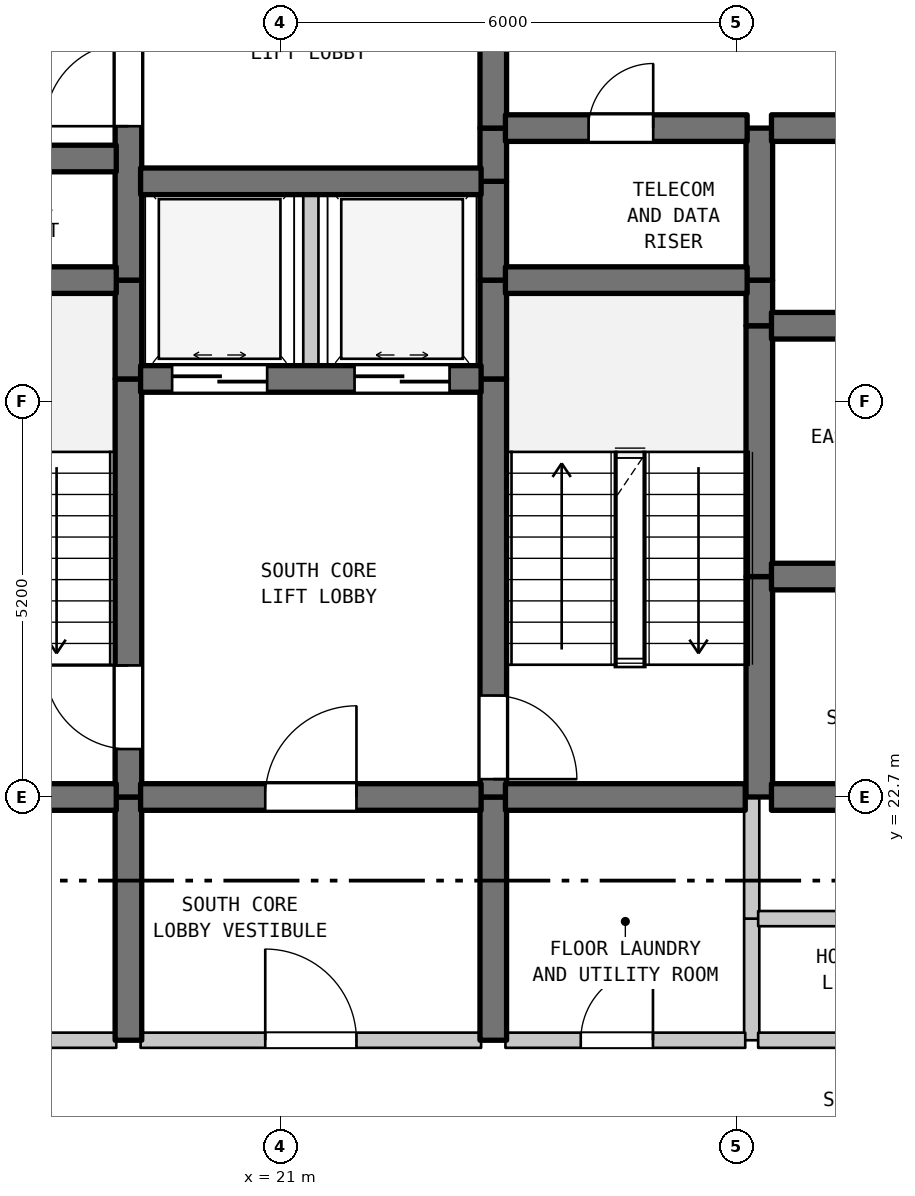
"""IFC4 building model, lengths in metres.
Left out: names, types, materials, properties, quantities, classifications, styles, units other than length and angle.
Written with IfcOpenShell. Run it as: python <this file> out.ifc"""

import sys

from ifc_helpers import new_model, si_unit, direction, frame, frame_2d, origin, place, context, subcontext, project, spatial, rectangle, extrude, element, fill, save


model = new_model("IFC4")
c1 = context("Model", 3, precision=1e-05, world=origin(), true_north=direction((0.0, 1.0)))
c2 = subcontext(c1, "Body", "Model", "MODEL_VIEW")
j1 = project(units=[si_unit("LENGTHUNIT", "METRE"), si_unit("PLANEANGLEUNIT", "RADIAN")], contexts=[c1])
p1 = place(None, origin())
s1 = spatial("IfcSite", under=j1, at=p1, CompositionType="ELEMENT")
p2 = place(p1, origin())
s2 = spatial("IfcBuilding", under=s1, at=p2, CompositionType="ELEMENT")
p3 = place(p2, frame((0.0, 0.0, 230.2)))
s3 = spatial("IfcBuildingStorey", under=s2, at=p3, CompositionType="ELEMENT", Elevation=230.2)
p4 = place(p3, frame((19.0, 19.5, 0.0), z_axis=(0.0, 0.0, 1.0), x_axis=(0.0, 1.0, 0.0)))
e1 = element("IfcWall", 1, at=p4, inside=s3, PredefinedType="SHEAR", context=c2, shape_type="SweptSolid", body=[
    extrude(rectangle(XDim=3.2, YDim=0.35, at=frame_2d((1.6, 0.0))), origin(), (0.0, 0.0, 1.0), 3.39),
])
p5 = place(p3, frame((19.0, 22.7, 0.0), z_axis=(0.0, 0.0, 1.0), x_axis=(0.0, 1.0, 0.0)))
e2 = element("IfcWall", 2, at=p5, inside=s3, PredefinedType="SHEAR", context=c2, shape_type="SweptSolid", body=[
    extrude(rectangle(XDim=5.5, YDim=0.35, at=frame_2d((2.75, 0.0))), origin(), (0.0, 0.0, 1.0), 3.39),
])
p6 = place(p5, frame((0.631, 0.0, 0.0)))
e3 = element("IfcOpeningElement", 3, at=p6, cuts=e2, PredefinedType="OPENING", context=c2, shape_type="SweptSolid", body=[
    extrude(rectangle(XDim=1.1, YDim=2.15, at=frame_2d((0.55, 1.075))), frame((0.0, 0.185, 0.0), z_axis=(0.0, -1.0, 0.0), x_axis=(1.0, 0.0, 0.0)), (0.0, 0.0, 1.0), 0.37),
])
p7 = place(p3, frame((19.0, 28.2, 0.0), z_axis=(0.0, 0.0, 1.0), x_axis=(0.0, 1.0, 0.0)))
e4 = element("IfcWall", 4, at=p7, inside=s3, PredefinedType="SHEAR", context=c2, shape_type="SweptSolid", body=[
    extrude(rectangle(XDim=1.3, YDim=0.35, at=frame_2d((0.65, 0.0))), origin(), (0.0, 0.0, 1.0), 3.39),
])
p8 = place(p3, frame((19.0, 29.5, 0.0), z_axis=(0.0, 0.0, 1.0), x_axis=(0.0, 1.0, 0.0)))
e5 = element("IfcWall", 5, at=p8, inside=s3, PredefinedType="SHEAR", context=c2, shape_type="SweptSolid", body=[
    extrude(rectangle(XDim=5.5, YDim=0.35, at=frame_2d((2.75, 0.0))), origin(), (0.0, 0.0, 1.0), 3.39),
])
p9 = place(p8, frame((2.025, 0.0, 0.0)))
e6 = element("IfcOpeningElement", 6, at=p9, cuts=e5, PredefinedType="OPENING", context=c2, shape_type="SweptSolid", body=[
    extrude(rectangle(XDim=1.1, YDim=2.15, at=frame_2d((0.55, 1.075))), frame((0.0, 0.185, 0.0), z_axis=(0.0, -1.0, 0.0), x_axis=(1.0, 0.0, 0.0)), (0.0, 0.0, 1.0), 0.37),
])
p10 = place(p3, frame((21.4, 28.2, 0.0), z_axis=(0.0, 0.0, 1.0), x_axis=(0.0, 1.0, 0.0)))
e7 = element("IfcWall", 7, at=p10, inside=s3, PredefinedType="STANDARD", context=c2, shape_type="SweptSolid", body=[
    extrude(rectangle(XDim=2.6, YDim=0.2, at=frame_2d((1.3, 0.0))), origin(), (0.0, 0.0, 1.0), 3.39),
])
p11 = place(p3, frame((23.8, 19.5, 0.0), z_axis=(0.0, 0.0, 1.0), x_axis=(0.0, 1.0, 0.0)))
e8 = element("IfcWall", 8, at=p11, inside=s3, PredefinedType="SHEAR", context=c2, shape_type="SweptSolid", body=[
    extrude(rectangle(XDim=3.2, YDim=0.35, at=frame_2d((1.6, 0.0))), origin(), (0.0, 0.0, 1.0), 3.39),
])
p12 = place(p3, frame((23.8, 22.7, 0.0), z_axis=(0.0, 0.0, 1.0), x_axis=(0.0, 1.0, 0.0)))
e9 = element("IfcWall", 9, at=p12, inside=s3, PredefinedType="SHEAR", context=c2, shape_type="SweptSolid", body=[
    extrude(rectangle(XDim=5.5, YDim=0.35, at=frame_2d((2.75, 0.0))), origin(), (0.0, 0.0, 1.0), 3.39),
])
p13 = place(p12, frame((0.235, 0.0, 0.0)))
e10 = element("IfcOpeningElement", 10, at=p13, cuts=e9, PredefinedType="OPENING", context=c2, shape_type="SweptSolid", body=[
    extrude(rectangle(XDim=1.1, YDim=2.15, at=frame_2d((0.55, 1.075))), frame((0.0, 0.185, 0.0), z_axis=(0.0, -1.0, 0.0), x_axis=(1.0, 0.0, 0.0)), (0.0, 0.0, 1.0), 0.37),
])
for number, where, z_axis, x_axis in (
    (11, (23.8, 28.2, 0.0), (0.0, 0.0, 1.0), (0.0, 1.0, 0.0)),
    (12, (23.8, 29.5, 0.0), (0.0, 0.0, 1.0), (0.0, 1.0, 0.0)),
):
    element("IfcWall", number, at=place(p3, frame(where, z_axis=z_axis, x_axis=x_axis)), inside=s3, PredefinedType="SHEAR", context=c2, shape_type="SweptSolid", body=[
        extrude(rectangle(XDim=1.3, YDim=0.35, at=frame_2d((0.65, 0.0))), origin(), (0.0, 0.0, 1.0), 3.39),
    ])
p14 = place(p3, frame((23.8, 30.8, 0.0), z_axis=(0.0, 0.0, 1.0), x_axis=(0.0, 1.0, 0.0)))
e13 = element("IfcWall", 13, at=p14, inside=s3, PredefinedType="SHEAR", context=c2, shape_type="SweptSolid", body=[
    extrude(rectangle(XDim=0.7, YDim=0.35, at=frame_2d((0.35, 0.0))), origin(), (0.0, 0.0, 1.0), 3.39),
])
p15 = place(p3, frame((23.8, 31.5, 0.0), z_axis=(0.0, 0.0, 1.0), x_axis=(0.0, 1.0, 0.0)))
e14 = element("IfcWall", 14, at=p15, inside=s3, PredefinedType="SHEAR", context=c2, shape_type="SweptSolid", body=[
    extrude(rectangle(XDim=3.5, YDim=0.35, at=frame_2d((1.75, 0.0))), origin(), (0.0, 0.0, 1.0), 3.39),
])
p16 = place(p15, frame((1.127, 0.0, 0.0)))
e15 = element("IfcOpeningElement", 15, at=p16, cuts=e14, PredefinedType="OPENING", context=c2, shape_type="SweptSolid", body=[
    extrude(rectangle(XDim=1.1, YDim=2.15, at=frame_2d((0.55, 1.075))), frame((0.0, 0.185, 0.0), z_axis=(0.0, -1.0, 0.0), x_axis=(1.0, 0.0, 0.0)), (0.0, 0.0, 1.0), 0.37),
])
p17 = place(p3, frame((27.2, 19.5, 0.0), z_axis=(0.0, 0.0, 1.0), x_axis=(0.0, 1.0, 0.0)))
e16 = element("IfcWall", 16, at=p17, inside=s3, PredefinedType="STANDARD", context=c2, shape_type="SweptSolid", body=[
    extrude(rectangle(XDim=1.6, YDim=0.2, at=frame_2d((0.8, 0.0))), origin(), (0.0, 0.0, 1.0), 3.39),
])
p18 = place(p3, frame((27.2, 21.1, 0.0), z_axis=(0.0, 0.0, 1.0), x_axis=(0.0, 1.0, 0.0)))
e17 = element("IfcWall", 17, at=p18, inside=s3, PredefinedType="STANDARD", context=c2, shape_type="SweptSolid", body=[
    extrude(rectangle(XDim=1.6, YDim=0.2, at=frame_2d((0.8, 0.0))), origin(), (0.0, 0.0, 1.0), 3.39),
])
p19 = place(p3, frame((27.3, 22.7, 0.0), z_axis=(0.0, 0.0, 1.0), x_axis=(0.0, 1.0, 0.0)))
e18 = element("IfcWall", 18, at=p19, inside=s3, PredefinedType="SHEAR", context=c2, shape_type="SweptSolid", body=[
    extrude(rectangle(XDim=2.9, YDim=0.35, at=frame_2d((1.45, 0.0))), origin(), (0.0, 0.0, 1.0), 3.39),
])
p20 = place(p3, frame((27.3, 25.6, 0.0), z_axis=(0.0, 0.0, 1.0), x_axis=(0.0, 1.0, 0.0)))
e19 = element("IfcWall", 19, at=p20, inside=s3, PredefinedType="SHEAR", context=c2, shape_type="SweptSolid", body=[
    extrude(rectangle(XDim=3.3, YDim=0.35, at=frame_2d((1.65, 0.0))), origin(), (0.0, 0.0, 1.0), 3.39),
])
p21 = place(p3, frame((27.3, 28.9, 0.0), z_axis=(0.0, 0.0, 1.0), x_axis=(0.0, 1.0, 0.0)))
e20 = element("IfcWall", 20, at=p21, inside=s3, PredefinedType="SHEAR", context=c2, shape_type="SweptSolid", body=[
    extrude(rectangle(XDim=0.6, YDim=0.35, at=frame_2d((0.3, 0.0))), origin(), (0.0, 0.0, 1.0), 3.39),
])
p22 = place(p3, frame((27.3, 29.5, 0.0), z_axis=(0.0, 0.0, 1.0), x_axis=(0.0, 1.0, 0.0)))
e21 = element("IfcWall", 21, at=p22, inside=s3, PredefinedType="SHEAR", context=c2, shape_type="SweptSolid", body=[
    extrude(rectangle(XDim=2.0, YDim=0.35, at=frame_2d((1.0, 0.0))), origin(), (0.0, 0.0, 1.0), 3.39),
])
p23 = place(p3, frame((15.16, 19.5, 0.0), z_axis=(0.0, 0.0, 1.0), x_axis=(1.0, 0.0, 0.0)))
e22 = element("IfcWall", 22, at=p23, inside=s3, PredefinedType="STANDARD", context=c2, shape_type="SweptSolid", body=[
    extrude(rectangle(XDim=3.68, YDim=0.2, at=frame_2d((1.84, 0.0))), origin(), (0.0, 0.0, 1.0), 3.39),
])
p24 = place(p23, frame((1.39, 0.0, 0.0)))
e23 = element("IfcOpeningElement", 23, at=p24, cuts=e22, PredefinedType="OPENING", context=c2, shape_type="SweptSolid", body=[
    extrude(rectangle(XDim=0.9, YDim=2.15, at=frame_2d((0.45, 1.075))), frame((0.0, 0.11, 0.0), z_axis=(0.0, -1.0, 0.0), x_axis=(1.0, 0.0, 0.0)), (0.0, 0.0, 1.0), 0.22),
])
p25 = place(p3, frame((19.16, 19.5, 0.0), z_axis=(0.0, 0.0, 1.0), x_axis=(1.0, 0.0, 0.0)))
e24 = element("IfcWall", 24, at=p25, inside=s3, PredefinedType="STANDARD", context=c2, shape_type="SweptSolid", body=[
    extrude(rectangle(XDim=4.48, YDim=0.2, at=frame_2d((2.24, 0.0))), origin(), (0.0, 0.0, 1.0), 3.39),
])
p26 = place(p25, frame((1.64, 0.0, 0.0)))
e25 = element("IfcOpeningElement", 25, at=p26, cuts=e24, PredefinedType="OPENING", context=c2, shape_type="SweptSolid", body=[
    extrude(rectangle(XDim=1.2, YDim=2.2, at=frame_2d((0.6, 1.1))), frame((0.0, 0.11, 0.0), z_axis=(0.0, -1.0, 0.0), x_axis=(1.0, 0.0, 0.0)), (0.0, 0.0, 1.0), 0.22),
])
p27 = place(p3, frame((23.96, 19.5, 0.0), z_axis=(0.0, 0.0, 1.0), x_axis=(1.0, 0.0, 0.0)))
e26 = element("IfcWall", 26, at=p27, inside=s3, PredefinedType="STANDARD", context=c2, shape_type="SweptSolid", body=[
    extrude(rectangle(XDim=3.155, YDim=0.2, at=frame_2d((1.578, 0.0))), origin(), (0.0, 0.0, 1.0), 3.39),
])
p28 = place(p27, frame((0.991, 0.0, 0.0)))
e27 = element("IfcOpeningElement", 27, at=p28, cuts=e26, PredefinedType="OPENING", context=c2, shape_type="SweptSolid", body=[
    extrude(rectangle(XDim=0.95, YDim=2.15, at=frame_2d((0.475, 1.075))), frame((0.0, 0.11, 0.0), z_axis=(0.0, -1.0, 0.0), x_axis=(1.0, 0.0, 0.0)), (0.0, 0.0, 1.0), 0.22),
])
p29 = place(p3, frame((27.285, 19.5, 0.0), z_axis=(0.0, 0.0, 1.0), x_axis=(1.0, 0.0, 0.0)))
e28 = element("IfcWall", 28, at=p29, inside=s3, PredefinedType="STANDARD", context=c2, shape_type="SweptSolid", body=[
    extrude(rectangle(XDim=3.43, YDim=0.2, at=frame_2d((1.715, 0.0))), origin(), (0.0, 0.0, 1.0), 3.39),
])
p30 = place(p29, frame((1.192, 0.0, 0.0)))
e29 = element("IfcOpeningElement", 29, at=p30, cuts=e28, PredefinedType="OPENING", context=c2, shape_type="SweptSolid", body=[
    extrude(rectangle(XDim=0.9, YDim=2.15, at=frame_2d((0.45, 1.075))), frame((0.0, 0.11, 0.0), z_axis=(0.0, -1.0, 0.0), x_axis=(1.0, 0.0, 0.0)), (0.0, 0.0, 1.0), 0.22),
])
p31 = place(p3, frame((27.285, 21.1, 0.0), z_axis=(0.0, 0.0, 1.0), x_axis=(1.0, 0.0, 0.0)))
e30 = element("IfcWall", 30, at=p31, inside=s3, PredefinedType="STANDARD", context=c2, shape_type="SweptSolid", body=[
    extrude(rectangle(XDim=3.355, YDim=0.2, at=frame_2d((1.677, 0.0))), origin(), (0.0, 0.0, 1.0), 3.39),
])
p32 = place(p3, frame((15.16, 22.7, 0.0), z_axis=(0.0, 0.0, 1.0), x_axis=(1.0, 0.0, 0.0)))
e31 = element("IfcWall", 31, at=p32, inside=s3, PredefinedType="SHEAR", context=c2, shape_type="SweptSolid", body=[
    extrude(rectangle(XDim=3.68, YDim=0.35, at=frame_2d((1.84, 0.0))), origin(), (0.0, 0.0, 1.0), 3.39),
])
p33 = place(p3, frame((19.16, 22.7, 0.0), z_axis=(0.0, 0.0, 1.0), x_axis=(1.0, 0.0, 0.0)))
e32 = element("IfcWall", 32, at=p33, inside=s3, PredefinedType="SHEAR", context=c2, shape_type="SweptSolid", body=[
    extrude(rectangle(XDim=4.48, YDim=0.35, at=frame_2d((2.24, 0.0))), origin(), (0.0, 0.0, 1.0), 3.39),
])
p34 = place(p33, frame((1.64, 0.0, 0.0)))
e33 = element("IfcOpeningElement", 33, at=p34, cuts=e32, PredefinedType="OPENING", context=c2, shape_type="SweptSolid", body=[
    extrude(rectangle(XDim=1.2, YDim=2.2, at=frame_2d((0.6, 1.1))), frame((0.0, 0.185, 0.0), z_axis=(0.0, -1.0, 0.0), x_axis=(1.0, 0.0, 0.0)), (0.0, 0.0, 1.0), 0.37),
])
p35 = place(p3, frame((23.96, 22.7, 0.0), z_axis=(0.0, 0.0, 1.0), x_axis=(1.0, 0.0, 0.0)))
e34 = element("IfcWall", 34, at=p35, inside=s3, PredefinedType="SHEAR", context=c2, shape_type="SweptSolid", body=[
    extrude(rectangle(XDim=3.155, YDim=0.35, at=frame_2d((1.578, 0.0))), origin(), (0.0, 0.0, 1.0), 3.39),
])
p36 = place(p3, frame((27.46, 22.7, 0.0), z_axis=(0.0, 0.0, 1.0), x_axis=(1.0, 0.0, 0.0)))
e35 = element("IfcWall", 35, at=p36, inside=s3, PredefinedType="SHEAR", context=c2, shape_type="SweptSolid", body=[
    extrude(rectangle(XDim=3.18, YDim=0.35, at=frame_2d((1.59, 0.0))), origin(), (0.0, 0.0, 1.0), 3.39),
])
p37 = place(p3, frame((27.46, 25.6, 0.0), z_axis=(0.0, 0.0, 1.0), x_axis=(1.0, 0.0, 0.0)))
e36 = element("IfcWall", 36, at=p37, inside=s3, PredefinedType="SHEAR", context=c2, shape_type="SweptSolid", body=[
    extrude(rectangle(XDim=3.18, YDim=0.35, at=frame_2d((1.59, 0.0))), origin(), (0.0, 0.0, 1.0), 3.39),
])
p38 = place(p37, frame((1.115, 0.0, 0.0)))
e37 = element("IfcOpeningElement", 37, at=p38, cuts=e36, PredefinedType="OPENING", context=c2, shape_type="SweptSolid", body=[
    extrude(rectangle(XDim=0.95, YDim=2.15, at=frame_2d((0.475, 1.075))), frame((0.0, 0.185, 0.0), z_axis=(0.0, -1.0, 0.0), x_axis=(1.0, 0.0, 0.0)), (0.0, 0.0, 1.0), 0.37),
])
p39 = place(p3, frame((19.16, 28.2, 0.0), z_axis=(0.0, 0.0, 1.0), x_axis=(1.0, 0.0, 0.0)))
e38 = element("IfcWall", 38, at=p39, inside=s3, PredefinedType="SHEAR", context=c2, shape_type="SweptSolid", body=[
    extrude(rectangle(XDim=4.48, YDim=0.35, at=frame_2d((2.24, 0.0))), origin(), (0.0, 0.0, 1.0), 3.39),
])
p40 = place(p39, frame((0.415, 0.0, 0.0)))
e39 = element("IfcOpeningElement", 39, at=p40, cuts=e38, PredefinedType="OPENING", context=c2, shape_type="SweptSolid", body=[
    extrude(rectangle(XDim=1.25, YDim=2.2, at=frame_2d((0.625, 1.1))), frame((0.0, 0.185, 0.0), z_axis=(0.0, -1.0, 0.0), x_axis=(1.0, 0.0, 0.0)), (0.0, 0.0, 1.0), 0.37),
])
p41 = place(p39, frame((2.815, 0.0, 0.0)))
e40 = element("IfcOpeningElement", 40, at=p41, cuts=e38, PredefinedType="OPENING", context=c2, shape_type="SweptSolid", body=[
    extrude(rectangle(XDim=1.25, YDim=2.2, at=frame_2d((0.625, 1.1))), frame((0.0, 0.185, 0.0), z_axis=(0.0, -1.0, 0.0), x_axis=(1.0, 0.0, 0.0)), (0.0, 0.0, 1.0), 0.37),
])
p42 = place(p3, frame((27.46, 28.9, 0.0), z_axis=(0.0, 0.0, 1.0), x_axis=(1.0, 0.0, 0.0)))
e41 = element("IfcWall", 41, at=p42, inside=s3, PredefinedType="SHEAR", context=c2, shape_type="SweptSolid", body=[
    extrude(rectangle(XDim=3.18, YDim=0.35, at=frame_2d((1.59, 0.0))), origin(), (0.0, 0.0, 1.0), 3.39),
])
p43 = place(p42, frame((1.115, 0.0, 0.0)))
e42 = element("IfcOpeningElement", 42, at=p43, cuts=e41, PredefinedType="OPENING", context=c2, shape_type="SweptSolid", body=[
    extrude(rectangle(XDim=0.95, YDim=2.15, at=frame_2d((0.475, 1.075))), frame((0.0, 0.185, 0.0), z_axis=(0.0, -1.0, 0.0), x_axis=(1.0, 0.0, 0.0)), (0.0, 0.0, 1.0), 0.37),
])
p44 = place(p3, frame((15.16, 29.5, 0.0), z_axis=(0.0, 0.0, 1.0), x_axis=(1.0, 0.0, 0.0)))
e43 = element("IfcWall", 43, at=p44, inside=s3, PredefinedType="SHEAR", context=c2, shape_type="SweptSolid", body=[
    extrude(rectangle(XDim=3.68, YDim=0.35, at=frame_2d((1.84, 0.0))), origin(), (0.0, 0.0, 1.0), 3.39),
])
p45 = place(p3, frame((23.96, 29.5, 0.0), z_axis=(0.0, 0.0, 1.0), x_axis=(1.0, 0.0, 0.0)))
e44 = element("IfcWall", 44, at=p45, inside=s3, PredefinedType="SHEAR", context=c2, shape_type="SweptSolid", body=[
    extrude(rectangle(XDim=3.18, YDim=0.35, at=frame_2d((1.59, 0.0))), origin(), (0.0, 0.0, 1.0), 3.39),
])
p46 = place(p3, frame((19.16, 30.8, 0.0), z_axis=(0.0, 0.0, 1.0), x_axis=(1.0, 0.0, 0.0)))
e45 = element("IfcWall", 45, at=p46, inside=s3, PredefinedType="SHEAR", context=c2, shape_type="SweptSolid", body=[
    extrude(rectangle(XDim=4.48, YDim=0.35, at=frame_2d((2.24, 0.0))), origin(), (0.0, 0.0, 1.0), 3.39),
])
p47 = place(p3, frame((15.16, 31.1, 0.0), z_axis=(0.0, 0.0, 1.0), x_axis=(1.0, 0.0, 0.0)))
e46 = element("IfcWall", 46, at=p47, inside=s3, PredefinedType="SHEAR", context=c2, shape_type="SweptSolid", body=[
    extrude(rectangle(XDim=3.68, YDim=0.35, at=frame_2d((1.84, 0.0))), origin(), (0.0, 0.0, 1.0), 3.39),
])
p48 = place(p3, frame((23.96, 31.5, 0.0), z_axis=(0.0, 0.0, 1.0), x_axis=(1.0, 0.0, 0.0)))
e47 = element("IfcWall", 47, at=p48, inside=s3, PredefinedType="SHEAR", context=c2, shape_type="SweptSolid", body=[
    extrude(rectangle(XDim=3.18, YDim=0.35, at=frame_2d((1.59, 0.0))), origin(), (0.0, 0.0, 1.0), 3.39),
])
p49 = place(p48, frame((1.094, 0.0, 0.0)))
e48 = element("IfcOpeningElement", 48, at=p49, cuts=e47, PredefinedType="OPENING", context=c2, shape_type="SweptSolid", body=[
    extrude(rectangle(XDim=0.85, YDim=2.1, at=frame_2d((0.425, 1.05))), frame((0.0, 0.185, 0.0), z_axis=(0.0, -1.0, 0.0), x_axis=(1.0, 0.0, 0.0)), (0.0, 0.0, 1.0), 0.37),
])
p50 = place(p3, frame((27.46, 31.5, 0.0), z_axis=(0.0, 0.0, 1.0), x_axis=(1.0, 0.0, 0.0)))
e49 = element("IfcWall", 49, at=p50, inside=s3, PredefinedType="SHEAR", context=c2, shape_type="SweptSolid", body=[
    extrude(rectangle(XDim=3.18, YDim=0.35, at=frame_2d((1.59, 0.0))), origin(), (0.0, 0.0, 1.0), 3.39),
])
p51 = place(p6, origin())
e50 = element("IfcDoor", 50, at=p51, inside=s3, OperationType="SINGLE_SWING_RIGHT", PredefinedType="DOOR", context=c2, shape_type="SweptSolid", body=[
    extrude(rectangle(XDim=1.1, YDim=2.15, at=frame_2d((0.55, 1.075))), frame((0.0, 0.025, 0.0), z_axis=(0.0, -1.0, 0.0), x_axis=(1.0, 0.0, 0.0)), (0.0, 0.0, 1.0), 0.05),
])
fill(e3, e50)
p52 = place(p9, origin())
e51 = element("IfcDoor", 51, at=p52, inside=s3, OperationType="SINGLE_SWING_LEFT", PredefinedType="DOOR", context=c2, shape_type="SweptSolid", body=[
    extrude(rectangle(XDim=1.1, YDim=2.15, at=frame_2d((0.55, 1.075))), frame((0.0, 0.025, 0.0), z_axis=(0.0, -1.0, 0.0), x_axis=(1.0, 0.0, 0.0)), (0.0, 0.0, 1.0), 0.05),
])
fill(e6, e51)
p53 = place(p13, frame((1.1, 0.0, 0.0), z_axis=(0.0, 0.0, 1.0), x_axis=(-1.0, 0.0, 0.0)))
e52 = element("IfcDoor", 52, at=p53, inside=s3, OperationType="SINGLE_SWING_LEFT", PredefinedType="DOOR", context=c2, shape_type="SweptSolid", body=[
    extrude(rectangle(XDim=1.1, YDim=2.15, at=frame_2d((0.55, 1.075))), frame((0.0, 0.025, 0.0), z_axis=(0.0, -1.0, 0.0), x_axis=(1.0, 0.0, 0.0)), (0.0, 0.0, 1.0), 0.05),
])
fill(e10, e52)
p54 = place(p26, origin())
e53 = element("IfcDoor", 53, at=p54, inside=s3, OperationType="SINGLE_SWING_LEFT", PredefinedType="DOOR", context=c2, shape_type="SweptSolid", body=[
    extrude(rectangle(XDim=1.2, YDim=2.2, at=frame_2d((0.6, 1.1))), frame((0.0, 0.025, 0.0), z_axis=(0.0, -1.0, 0.0), x_axis=(1.0, 0.0, 0.0)), (0.0, 0.0, 1.0), 0.05),
])
fill(e25, e53)
p55 = place(p28, origin())
e54 = element("IfcDoor", 54, at=p55, inside=s3, OperationType="SINGLE_SWING_RIGHT", PredefinedType="DOOR", context=c2, shape_type="SweptSolid", body=[
    extrude(rectangle(XDim=0.95, YDim=2.15, at=frame_2d((0.475, 1.075))), frame((0.0, 0.025, 0.0), z_axis=(0.0, -1.0, 0.0), x_axis=(1.0, 0.0, 0.0)), (0.0, 0.0, 1.0), 0.05),
])
fill(e27, e54)
p56 = place(p34, origin())
e55 = element("IfcDoor", 55, at=p56, inside=s3, OperationType="SINGLE_SWING_RIGHT", PredefinedType="DOOR", context=c2, shape_type="SweptSolid", body=[
    extrude(rectangle(XDim=1.2, YDim=2.2, at=frame_2d((0.6, 1.1))), frame((0.0, 0.025, 0.0), z_axis=(0.0, -1.0, 0.0), x_axis=(1.0, 0.0, 0.0)), (0.0, 0.0, 1.0), 0.05),
])
fill(e33, e55)
p57 = place(p40, origin())
e56 = element("IfcDoor", 56, at=p57, inside=s3, OperationType="DOUBLE_DOOR_SLIDING", PredefinedType="DOOR", context=c2, shape_type="SweptSolid", body=[
    extrude(rectangle(XDim=1.25, YDim=2.2, at=frame_2d((0.625, 1.1))), frame((0.0, 0.025, 0.0), z_axis=(0.0, -1.0, 0.0), x_axis=(1.0, 0.0, 0.0)), (0.0, 0.0, 1.0), 0.05),
])
fill(e39, e56)
p58 = place(p41, origin())
e57 = element("IfcDoor", 57, at=p58, inside=s3, OperationType="DOUBLE_DOOR_SLIDING", PredefinedType="DOOR", context=c2, shape_type="SweptSolid", body=[
    extrude(rectangle(XDim=1.25, YDim=2.2, at=frame_2d((0.625, 1.1))), frame((0.0, 0.025, 0.0), z_axis=(0.0, -1.0, 0.0), x_axis=(1.0, 0.0, 0.0)), (0.0, 0.0, 1.0), 0.05),
])
fill(e40, e57)
p59 = place(p49, origin())
e58 = element("IfcDoor", 58, at=p59, inside=s3, OperationType="SINGLE_SWING_RIGHT", PredefinedType="DOOR", context=c2, shape_type="SweptSolid", body=[
    extrude(rectangle(XDim=0.85, YDim=2.1, at=frame_2d((0.425, 1.05))), frame((0.0, 0.025, 0.0), z_axis=(0.0, -1.0, 0.0), x_axis=(1.0, 0.0, 0.0)), (0.0, 0.0, 1.0), 0.05),
])
fill(e48, e58)
save(model, sys.argv[1])
